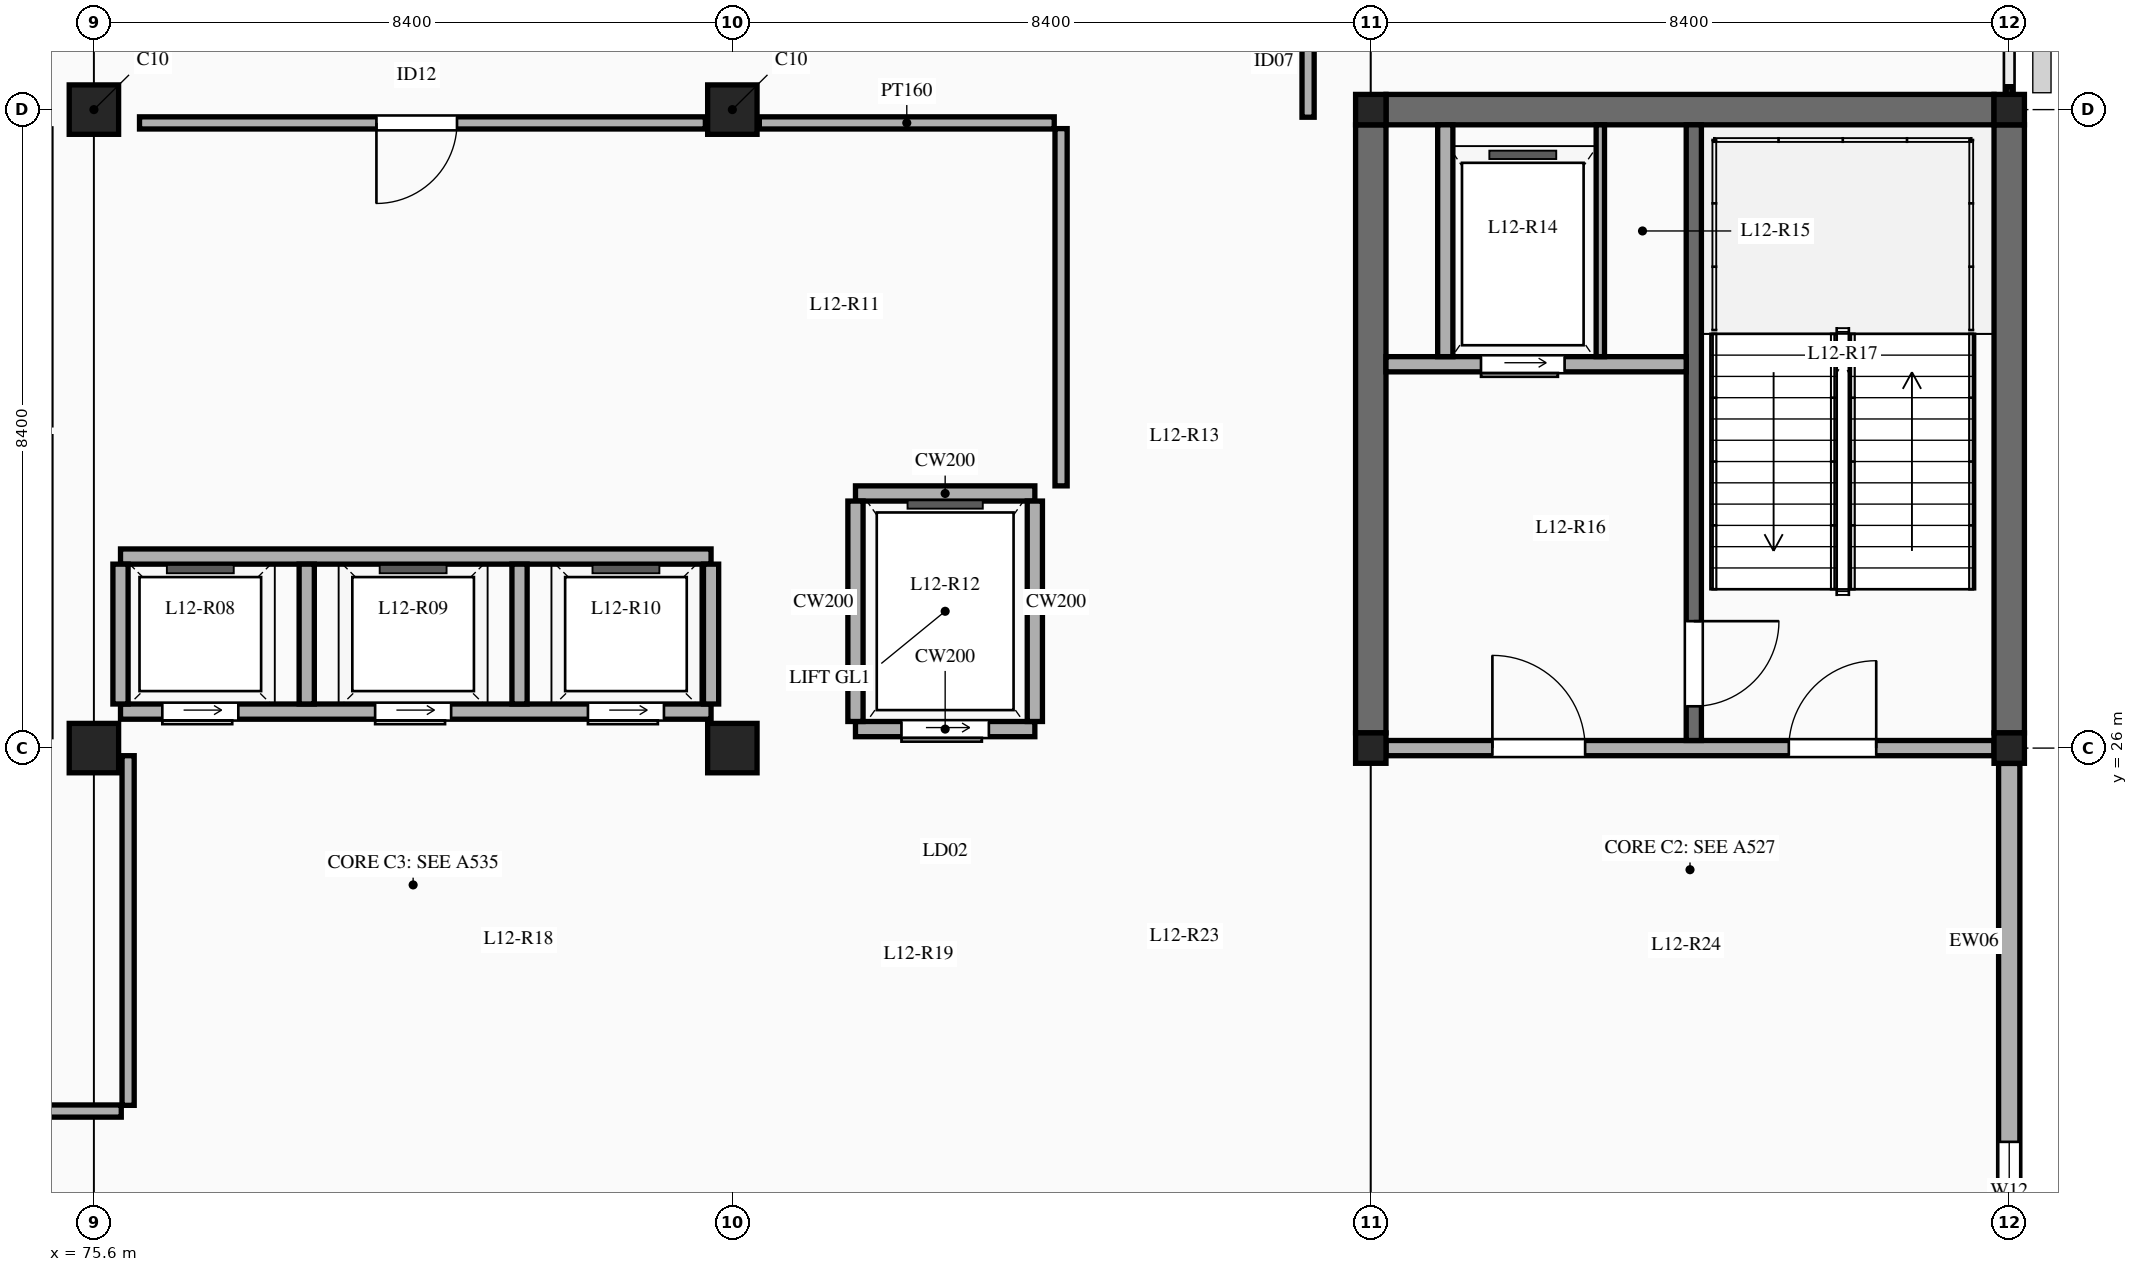
"""IFC4 building model, lengths in metres.
Left out: names, types, materials, properties, quantities, classifications, styles, units other than length and angle.
Written with IfcOpenShell. Run it as: python <this file> out.ifc"""

import sys

from ifc_helpers import new_model, si_unit, direction, frame, frame_2d, origin, origin_2d, place, context, subcontext, project, spatial, rectangle, extrude, element, fill, save


model = new_model("IFC4")
c1 = context("Model", 3, precision=1e-05, world=origin(), true_north=direction((0.0, 1.0)))
c2 = subcontext(c1, "Body", "Model", "MODEL_VIEW")
j1 = project(units=[si_unit("LENGTHUNIT", "METRE"), si_unit("PLANEANGLEUNIT", "RADIAN")], contexts=[c1])
p1 = place(None, origin())
s1 = spatial("IfcSite", under=j1, at=p1, CompositionType="ELEMENT")
p2 = place(p1, origin())
s2 = spatial("IfcBuilding", under=s1, at=p2, CompositionType="ELEMENT")
p3 = place(p2, frame((0.0, 0.0, 55.5)))
s3 = spatial("IfcBuildingStorey", under=s2, at=p3, CompositionType="ELEMENT", Elevation=55.5)
for number, where, z_axis, x_axis in (
    (1, (75.6, 26.0, 0.0), (0.0, 0.0, 1.0), (1.0, 0.0, 0.0)),
    (2, (75.6, 34.4, 0.0), (0.0, 0.0, 1.0), (1.0, 0.0, 0.0)),
    (3, (84.0, 26.0, 0.0), (0.0, 0.0, 1.0), (1.0, 0.0, 0.0)),
    (4, (84.0, 34.4, 0.0), (0.0, 0.0, 1.0), (1.0, 0.0, 0.0)),
):
    element("IfcColumn", number, at=place(p3, frame(where, z_axis=z_axis, x_axis=x_axis)), inside=s3, PredefinedType="COLUMN", context=c2, shape_type="SweptSolid", body=[
        extrude(rectangle(XDim=0.65, YDim=0.65, at=origin_2d()), origin(), (0.0, 0.0, 1.0), 4.5),
    ])
for number, where, z_axis, x_axis in (
    (5, (92.4, 26.0, 0.0), (0.0, 0.0, 1.0), (1.0, 0.0, 0.0)),
    (6, (92.4, 34.4, 0.0), (0.0, 0.0, 1.0), (1.0, 0.0, 0.0)),
    (7, (100.8, 26.0, 0.0), (0.0, 0.0, 1.0), (1.0, 0.0, 0.0)),
    (8, (100.8, 34.4, 0.0), (0.0, 0.0, 1.0), (1.0, 0.0, 0.0)),
):
    element("IfcColumn", number, at=place(p3, frame(where, z_axis=z_axis, x_axis=x_axis)), inside=s3, PredefinedType="COLUMN", context=c2, shape_type="SweptSolid", body=[
        extrude(rectangle(XDim=0.4, YDim=0.4, at=origin_2d()), origin(), (0.0, 0.0, 1.0), 4.5),
    ])
for number, where, z_axis, x_axis in (
    (9, (92.4, 26.2, 0.0), (0.0, 0.0, 1.0), (0.0, 1.0, 0.0)),
    (10, (100.8, 26.2, 0.0), (0.0, 0.0, 1.0), (0.0, 1.0, 0.0)),
    (11, (92.6, 34.4, 0.0), (0.0, 0.0, 1.0), (1.0, 0.0, 0.0)),
):
    element("IfcWall", number, at=place(p3, frame(where, z_axis=z_axis, x_axis=x_axis)), inside=s3, PredefinedType="SHEAR", context=c2, shape_type="SweptSolid", body=[
        extrude(rectangle(XDim=8.0, YDim=0.4, at=frame_2d((4.0, 0.0))), origin(), (0.0, 0.0, 1.0), 4.5),
    ])
p4 = place(p3, frame((100.8, 17.927, 0.0), z_axis=(0.0, 0.0, 1.0), x_axis=(0.0, 1.0, 0.0)))
e12 = element("IfcWall", 12, at=p4, inside=s3, PredefinedType="ELEMENTEDWALL", context=c2, shape_type="SweptSolid", body=[
    extrude(rectangle(XDim=7.871, YDim=0.28, at=frame_2d((3.936, 0.0))), origin(), (0.0, 0.0, 1.0), 3.55),
])
p5 = place(p4, frame((1.043, 0.0, 0.9)))
e13 = element("IfcOpeningElement", 13, at=p5, cuts=e12, PredefinedType="OPENING", context=c2, shape_type="SweptSolid", body=[
    extrude(rectangle(XDim=1.85, YDim=2.05, at=frame_2d((0.925, 1.025))), frame((0.0, 0.15, 0.0), z_axis=(0.0, -1.0, 0.0), x_axis=(1.0, 0.0, 0.0)), (0.0, 0.0, 1.0), 0.3),
])
p6 = place(p3, frame((92.6, 26.0, 0.0), z_axis=(0.0, 0.0, 1.0), x_axis=(1.0, 0.0, 0.0)))
e14 = element("IfcWall", 14, at=p6, inside=s3, PredefinedType="SOLIDWALL", context=c2, shape_type="SweptSolid", body=[
    extrude(rectangle(XDim=8.0, YDim=0.2, at=frame_2d((4.0, 0.0))), origin(), (0.0, 0.0, 1.0), 3.83),
])
p7 = place(p6, frame((1.4, 0.0, 0.0)))
e15 = element("IfcOpeningElement", 15, at=p7, cuts=e14, PredefinedType="OPENING", context=c2, shape_type="SweptSolid", body=[
    extrude(rectangle(XDim=1.22, YDim=2.15, at=frame_2d((0.61, 1.075))), frame((0.0, 0.11, 0.0), z_axis=(0.0, -1.0, 0.0), x_axis=(1.0, 0.0, 0.0)), (0.0, 0.0, 1.0), 0.22),
])
p8 = place(p6, frame((5.3, 0.0, 0.0)))
e16 = element("IfcOpeningElement", 16, at=p8, cuts=e14, PredefinedType="OPENING", context=c2, shape_type="SweptSolid", body=[
    extrude(rectangle(XDim=1.15, YDim=2.15, at=frame_2d((0.575, 1.075))), frame((0.0, 0.11, 0.0), z_axis=(0.0, -1.0, 0.0), x_axis=(1.0, 0.0, 0.0)), (0.0, 0.0, 1.0), 0.22),
])
p9 = place(p3, frame((96.65, 26.1, 0.0), z_axis=(0.0, 0.0, 1.0), x_axis=(0.0, 1.0, 0.0)))
e17 = element("IfcWall", 17, at=p9, inside=s3, PredefinedType="SOLIDWALL", context=c2, shape_type="SweptSolid", body=[
    extrude(rectangle(XDim=8.1, YDim=0.2, at=frame_2d((4.05, 0.0))), origin(), (0.0, 0.0, 1.0), 4.3),
])
p10 = place(p9, frame((0.45, 0.0, 0.0)))
e18 = element("IfcOpeningElement", 18, at=p10, cuts=e17, PredefinedType="OPENING", context=c2, shape_type="SweptSolid", body=[
    extrude(rectangle(XDim=1.12, YDim=2.15, at=frame_2d((0.56, 1.075))), frame((0.0, 0.11, 0.0), z_axis=(0.0, -1.0, 0.0), x_axis=(1.0, 0.0, 0.0)), (0.0, 0.0, 1.0), 0.22),
])
p11 = place(p3, frame((92.6, 31.05, 0.0), z_axis=(0.0, 0.0, 1.0), x_axis=(1.0, 0.0, 0.0)))
e19 = element("IfcWall", 19, at=p11, inside=s3, PredefinedType="SOLIDWALL", context=c2, shape_type="SweptSolid", body=[
    extrude(rectangle(XDim=3.95, YDim=0.2, at=frame_2d((1.975, 0.0))), origin(), (0.0, 0.0, 1.0), 4.3),
])
p12 = place(p11, frame((1.25, 0.0, 0.0)))
e20 = element("IfcOpeningElement", 20, at=p12, cuts=e19, PredefinedType="OPENING", context=c2, shape_type="SweptSolid", body=[
    extrude(rectangle(XDim=1.1, YDim=2.15, at=frame_2d((0.55, 1.075))), frame((0.0, 0.11, 0.0), z_axis=(0.0, -1.0, 0.0), x_axis=(1.0, 0.0, 0.0)), (0.0, 0.0, 1.0), 0.22),
])
p13 = place(p3, frame((95.42, 31.15, 0.0), z_axis=(0.0, 0.0, 1.0), x_axis=(0.0, 1.0, 0.0)))
e21 = element("IfcWall", 21, at=p13, inside=s3, PredefinedType="PARTITIONING", context=c2, shape_type="SweptSolid", body=[
    extrude(rectangle(XDim=3.05, YDim=0.11, at=frame_2d((1.525, 0.0))), origin(), (0.0, 0.0, 1.0), 4.3),
])
p14 = place(p3, frame((93.38, 31.15, 0.0), z_axis=(0.0, 0.0, 1.0), x_axis=(0.0, 1.0, 0.0)))
e22 = element("IfcWall", 22, at=p14, inside=s3, PredefinedType="SOLIDWALL", context=c2, shape_type="SweptSolid", body=[
    extrude(rectangle(XDim=3.05, YDim=0.2, at=frame_2d((1.525, 0.0))), origin(), (0.0, 0.0, 1.0), 4.3),
])
p15 = place(p3, frame((75.95, 26.48, 0.0), z_axis=(0.0, 0.0, 1.0), x_axis=(1.0, 0.0, 0.0)))
e23 = element("IfcWall", 23, at=p15, inside=s3, PredefinedType="SOLIDWALL", context=c2, shape_type="SweptSolid", body=[
    extrude(rectangle(XDim=7.77, YDim=0.2, at=frame_2d((3.885, 0.0))), origin(), (0.0, 0.0, 1.0), 4.3),
])
p16 = place(p15, frame((0.55, 0.0, 0.0)))
e24 = element("IfcOpeningElement", 24, at=p16, cuts=e23, PredefinedType="OPENING", context=c2, shape_type="SweptSolid", body=[
    extrude(rectangle(XDim=1.0, YDim=2.15, at=frame_2d((0.5, 1.075))), frame((0.0, 0.11, 0.0), z_axis=(0.0, -1.0, 0.0), x_axis=(1.0, 0.0, 0.0)), (0.0, 0.0, 1.0), 0.22),
])
p17 = place(p15, frame((3.35, 0.0, 0.0)))
e25 = element("IfcOpeningElement", 25, at=p17, cuts=e23, PredefinedType="OPENING", context=c2, shape_type="SweptSolid", body=[
    extrude(rectangle(XDim=1.0, YDim=2.15, at=frame_2d((0.5, 1.075))), frame((0.0, 0.11, 0.0), z_axis=(0.0, -1.0, 0.0), x_axis=(1.0, 0.0, 0.0)), (0.0, 0.0, 1.0), 0.22),
])
p18 = place(p15, frame((6.15, 0.0, 0.0)))
e26 = element("IfcOpeningElement", 26, at=p18, cuts=e23, PredefinedType="OPENING", context=c2, shape_type="SweptSolid", body=[
    extrude(rectangle(XDim=1.0, YDim=2.15, at=frame_2d((0.5, 1.075))), frame((0.0, 0.11, 0.0), z_axis=(0.0, -1.0, 0.0), x_axis=(1.0, 0.0, 0.0)), (0.0, 0.0, 1.0), 0.22),
])
p19 = place(p3, frame((75.95, 28.52, 0.0), z_axis=(0.0, 0.0, 1.0), x_axis=(1.0, 0.0, 0.0)))
e27 = element("IfcWall", 27, at=p19, inside=s3, PredefinedType="SOLIDWALL", context=c2, shape_type="SweptSolid", body=[
    extrude(rectangle(XDim=7.77, YDim=0.2, at=frame_2d((3.885, 0.0))), origin(), (0.0, 0.0, 1.0), 4.3),
])
for number, where, z_axis, x_axis in (
    (28, (75.95, 26.58, 0.0), (0.0, 0.0, 1.0), (0.0, 1.0, 0.0)),
    (29, (78.4, 26.58, 0.0), (0.0, 0.0, 1.0), (0.0, 1.0, 0.0)),
    (30, (81.2, 26.58, 0.0), (0.0, 0.0, 1.0), (0.0, 1.0, 0.0)),
):
    element("IfcWall", number, at=place(p3, frame(where, z_axis=z_axis, x_axis=x_axis)), inside=s3, PredefinedType="SOLIDWALL", context=c2, shape_type="SweptSolid", body=[
        extrude(rectangle(XDim=1.84, YDim=0.2, at=frame_2d((0.92, 0.0))), origin(), (0.0, 0.0, 1.0), 4.3),
    ])
p20 = place(p3, frame((83.72, 26.58, 0.0), z_axis=(0.0, 0.0, 1.0), x_axis=(0.0, 1.0, 0.0)))
e31 = element("IfcWall", 31, at=p20, inside=s3, PredefinedType="SOLIDWALL", context=c2, shape_type="SweptSolid", body=[
    extrude(rectangle(XDim=1.84, YDim=0.2, at=frame_2d((0.92, 0.0))), origin(), (0.0, 0.0, 1.0), 3.88),
])
p21 = place(p3, frame((85.62, 26.25, 0.0), z_axis=(0.0, 0.0, 1.0), x_axis=(1.0, 0.0, 0.0)))
e32 = element("IfcWall", 32, at=p21, inside=s3, PredefinedType="SOLIDWALL", context=c2, shape_type="SweptSolid", body=[
    extrude(rectangle(XDim=2.36, YDim=0.2, at=frame_2d((1.18, 0.0))), origin(), (0.0, 0.0, 1.0), 3.83),
])
p22 = place(p21, frame((0.605, 0.0, 0.0)))
e33 = element("IfcOpeningElement", 33, at=p22, cuts=e32, PredefinedType="OPENING", context=c2, shape_type="SweptSolid", body=[
    extrude(rectangle(XDim=1.15, YDim=2.2, at=frame_2d((0.575, 1.1))), frame((0.0, 0.11, 0.0), z_axis=(0.0, -1.0, 0.0), x_axis=(1.0, 0.0, 0.0)), (0.0, 0.0, 1.0), 0.22),
])
p23 = place(p3, frame((85.62, 29.35, 0.0), z_axis=(0.0, 0.0, 1.0), x_axis=(1.0, 0.0, 0.0)))
e34 = element("IfcWall", 34, at=p23, inside=s3, PredefinedType="SOLIDWALL", context=c2, shape_type="SweptSolid", body=[
    extrude(rectangle(XDim=2.36, YDim=0.2, at=frame_2d((1.18, 0.0))), origin(), (0.0, 0.0, 1.0), 4.3),
])
p24 = place(p3, frame((85.62, 26.35, 0.0), z_axis=(0.0, 0.0, 1.0), x_axis=(0.0, 1.0, 0.0)))
e35 = element("IfcWall", 35, at=p24, inside=s3, PredefinedType="SOLIDWALL", context=c2, shape_type="SweptSolid", body=[
    extrude(rectangle(XDim=2.9, YDim=0.2, at=frame_2d((1.45, 0.0))), origin(), (0.0, 0.0, 1.0), 4.3),
])
p25 = place(p3, frame((87.98, 26.35, 0.0), z_axis=(0.0, 0.0, 1.0), x_axis=(0.0, 1.0, 0.0)))
e36 = element("IfcWall", 36, at=p25, inside=s3, PredefinedType="SOLIDWALL", context=c2, shape_type="SweptSolid", body=[
    extrude(rectangle(XDim=2.9, YDim=0.2, at=frame_2d((1.45, 0.0))), origin(), (0.0, 0.0, 1.0), 4.03),
])
p26 = place(p3, frame((88.325, 29.45, 0.0), z_axis=(0.0, 0.0, 1.0), x_axis=(0.0, 1.0, 0.0)))
e37 = element("IfcWall", 37, at=p26, inside=s3, PredefinedType="PARTITIONING", context=c2, shape_type="SweptSolid", body=[
    extrude(rectangle(XDim=4.7, YDim=0.16, at=frame_2d((2.35, 0.0))), origin(), (0.0, 0.0, 1.0), 3.45),
])
p27 = place(p3, frame((76.2, 34.225, 0.0), z_axis=(0.0, 0.0, 1.0), x_axis=(1.0, 0.0, 0.0)))
e38 = element("IfcWall", 38, at=p27, inside=s3, PredefinedType="PARTITIONING", context=c2, shape_type="SweptSolid", body=[
    extrude(rectangle(XDim=7.445, YDim=0.16, at=frame_2d((3.723, 0.0))), origin(), (0.0, 0.0, 1.0), 3.45),
])
p28 = place(p27, frame((3.117, 0.0, 0.0)))
e39 = element("IfcOpeningElement", 39, at=p28, cuts=e38, PredefinedType="OPENING", context=c2, shape_type="SweptSolid", body=[
    extrude(rectangle(XDim=1.06, YDim=2.18, at=frame_2d((0.53, 1.09))), frame((0.0, 0.09, 0.0), z_axis=(0.0, -1.0, 0.0), x_axis=(1.0, 0.0, 0.0)), (0.0, 0.0, 1.0), 0.18),
])
p29 = place(p3, frame((84.355, 34.225, 0.0), z_axis=(0.0, 0.0, 1.0), x_axis=(1.0, 0.0, 0.0)))
e40 = element("IfcWall", 40, at=p29, inside=s3, PredefinedType="PARTITIONING", context=c2, shape_type="SweptSolid", body=[
    extrude(rectangle(XDim=3.88, YDim=0.16, at=frame_2d((1.94, 0.0))), origin(), (0.0, 0.0, 1.0), 3.45),
])
p30 = place(p3, frame((76.05, 21.3, 0.0), z_axis=(0.0, 0.0, 1.0), x_axis=(0.0, 1.0, 0.0)))
e41 = element("IfcWall", 41, at=p30, inside=s3, PredefinedType="PARTITIONING", context=c2, shape_type="SweptSolid", body=[
    extrude(rectangle(XDim=4.6, YDim=0.16, at=frame_2d((2.3, 0.0))), origin(), (0.0, 0.0, 1.0), 3.45),
])
p31 = place(p3, frame((71.05, 21.225, 0.0), z_axis=(0.0, 0.0, 1.0), x_axis=(1.0, 0.0, 0.0)))
e42 = element("IfcWall", 42, at=p31, inside=s3, PredefinedType="PARTITIONING", context=c2, shape_type="SweptSolid", body=[
    extrude(rectangle(XDim=4.91, YDim=0.16, at=frame_2d((2.455, 0.0))), origin(), (0.0, 0.0, 1.0), 3.45),
])
p32 = place(p31, frame((1.925, 0.0, 0.0)))
e43 = element("IfcOpeningElement", 43, at=p32, cuts=e42, PredefinedType="OPENING", context=c2, shape_type="SweptSolid", body=[
    extrude(rectangle(XDim=1.06, YDim=2.18, at=frame_2d((0.53, 1.09))), frame((0.0, 0.09, 0.0), z_axis=(0.0, -1.0, 0.0), x_axis=(1.0, 0.0, 0.0)), (0.0, 0.0, 1.0), 0.18),
])
p33 = place(p3, frame((91.575, 34.3, 0.0), z_axis=(0.0, 0.0, 1.0), x_axis=(0.0, 1.0, 0.0)))
e44 = element("IfcWall", 44, at=p33, inside=s3, PredefinedType="PARTITIONING", context=c2, shape_type="SweptSolid", body=[
    extrude(rectangle(XDim=2.74, YDim=0.16, at=frame_2d((1.37, 0.0))), origin(), (0.0, 0.0, 1.0), 3.45),
])
p34 = place(p33, frame((1.19, 0.0, 0.0)))
e45 = element("IfcOpeningElement", 45, at=p34, cuts=e44, PredefinedType="OPENING", context=c2, shape_type="SweptSolid", body=[
    extrude(rectangle(XDim=1.3, YDim=2.25, at=frame_2d((0.65, 1.125))), frame((0.0, 0.09, 0.0), z_axis=(0.0, -1.0, 0.0), x_axis=(1.0, 0.0, 0.0)), (0.0, 0.0, 1.0), 0.18),
])
p35 = place(p5, origin())
e46 = element("IfcWindow", 46, at=p35, inside=s3, PartitioningType="DOUBLE_PANEL_HORIZONTAL", PredefinedType="WINDOW", context=c2, shape_type="SweptSolid", body=[
    extrude(rectangle(XDim=1.85, YDim=2.05, at=frame_2d((0.925, 1.025))), frame((0.0, 0.03, 0.0), z_axis=(0.0, -1.0, 0.0), x_axis=(1.0, 0.0, 0.0)), (0.0, 0.0, 1.0), 0.06),
])
fill(e13, e46)
p36 = place(p7, origin())
e47 = element("IfcDoor", 47, at=p36, inside=s3, OperationType="SINGLE_SWING_LEFT", PredefinedType="DOOR", context=c2, shape_type="SweptSolid", body=[
    extrude(rectangle(XDim=1.22, YDim=2.15, at=frame_2d((0.61, 1.075))), frame((0.0, 0.025, 0.0), z_axis=(0.0, -1.0, 0.0), x_axis=(1.0, 0.0, 0.0)), (0.0, 0.0, 1.0), 0.05),
])
fill(e15, e47)
p37 = place(p8, origin())
e48 = element("IfcDoor", 48, at=p37, inside=s3, OperationType="SINGLE_SWING_RIGHT", PredefinedType="DOOR", context=c2, shape_type="SweptSolid", body=[
    extrude(rectangle(XDim=1.15, YDim=2.15, at=frame_2d((0.575, 1.075))), frame((0.0, 0.025, 0.0), z_axis=(0.0, -1.0, 0.0), x_axis=(1.0, 0.0, 0.0)), (0.0, 0.0, 1.0), 0.05),
])
fill(e16, e48)
p38 = place(p10, frame((1.12, 0.0, 0.0), z_axis=(0.0, 0.0, 1.0), x_axis=(-1.0, 0.0, 0.0)))
e49 = element("IfcDoor", 49, at=p38, inside=s3, OperationType="SINGLE_SWING_LEFT", PredefinedType="DOOR", context=c2, shape_type="SweptSolid", body=[
    extrude(rectangle(XDim=1.12, YDim=2.15, at=frame_2d((0.56, 1.075))), frame((0.0, 0.025, 0.0), z_axis=(0.0, -1.0, 0.0), x_axis=(1.0, 0.0, 0.0)), (0.0, 0.0, 1.0), 0.05),
])
fill(e18, e49)
p39 = place(p12, frame((1.1, 0.0, 0.0), z_axis=(0.0, 0.0, 1.0), x_axis=(-1.0, 0.0, 0.0)))
e50 = element("IfcDoor", 50, at=p39, inside=s3, OperationType="SLIDING_TO_LEFT", PredefinedType="DOOR", context=c2, shape_type="SweptSolid", body=[
    extrude(rectangle(XDim=1.1, YDim=2.15, at=frame_2d((0.55, 1.075))), frame((0.0, 0.025, 0.0), z_axis=(0.0, -1.0, 0.0), x_axis=(1.0, 0.0, 0.0)), (0.0, 0.0, 1.0), 0.05),
])
fill(e20, e50)
p40 = place(p16, frame((1.0, 0.0, 0.0), z_axis=(0.0, 0.0, 1.0), x_axis=(-1.0, 0.0, 0.0)))
e51 = element("IfcDoor", 51, at=p40, inside=s3, OperationType="SLIDING_TO_LEFT", PredefinedType="DOOR", context=c2, shape_type="SweptSolid", body=[
    extrude(rectangle(XDim=1.0, YDim=2.15, at=frame_2d((0.5, 1.075))), frame((0.0, 0.025, 0.0), z_axis=(0.0, -1.0, 0.0), x_axis=(1.0, 0.0, 0.0)), (0.0, 0.0, 1.0), 0.05),
])
fill(e24, e51)
p41 = place(p17, frame((1.0, 0.0, 0.0), z_axis=(0.0, 0.0, 1.0), x_axis=(-1.0, 0.0, 0.0)))
e52 = element("IfcDoor", 52, at=p41, inside=s3, OperationType="SLIDING_TO_LEFT", PredefinedType="DOOR", context=c2, shape_type="SweptSolid", body=[
    extrude(rectangle(XDim=1.0, YDim=2.15, at=frame_2d((0.5, 1.075))), frame((0.0, 0.025, 0.0), z_axis=(0.0, -1.0, 0.0), x_axis=(1.0, 0.0, 0.0)), (0.0, 0.0, 1.0), 0.05),
])
fill(e25, e52)
p42 = place(p18, frame((1.0, 0.0, 0.0), z_axis=(0.0, 0.0, 1.0), x_axis=(-1.0, 0.0, 0.0)))
e53 = element("IfcDoor", 53, at=p42, inside=s3, OperationType="SLIDING_TO_LEFT", PredefinedType="DOOR", context=c2, shape_type="SweptSolid", body=[
    extrude(rectangle(XDim=1.0, YDim=2.15, at=frame_2d((0.5, 1.075))), frame((0.0, 0.025, 0.0), z_axis=(0.0, -1.0, 0.0), x_axis=(1.0, 0.0, 0.0)), (0.0, 0.0, 1.0), 0.05),
])
fill(e26, e53)
p43 = place(p22, frame((1.15, 0.0, 0.0), z_axis=(0.0, 0.0, 1.0), x_axis=(-1.0, 0.0, 0.0)))
e54 = element("IfcDoor", 54, at=p43, inside=s3, OperationType="SLIDING_TO_LEFT", PredefinedType="DOOR", context=c2, shape_type="SweptSolid", body=[
    extrude(rectangle(XDim=1.15, YDim=2.2, at=frame_2d((0.575, 1.1))), frame((0.0, 0.025, 0.0), z_axis=(0.0, -1.0, 0.0), x_axis=(1.0, 0.0, 0.0)), (0.0, 0.0, 1.0), 0.05),
])
fill(e33, e54)
p44 = place(p28, frame((1.06, 0.0, 0.0), z_axis=(0.0, 0.0, 1.0), x_axis=(-1.0, 0.0, 0.0)))
e55 = element("IfcDoor", 55, at=p44, inside=s3, OperationType="SINGLE_SWING_RIGHT", PredefinedType="DOOR", context=c2, shape_type="SweptSolid", body=[
    extrude(rectangle(XDim=1.06, YDim=2.18, at=frame_2d((0.53, 1.09))), frame((0.0, 0.025, 0.0), z_axis=(0.0, -1.0, 0.0), x_axis=(1.0, 0.0, 0.0)), (0.0, 0.0, 1.0), 0.05),
])
fill(e39, e55)
save(model, sys.argv[1])
